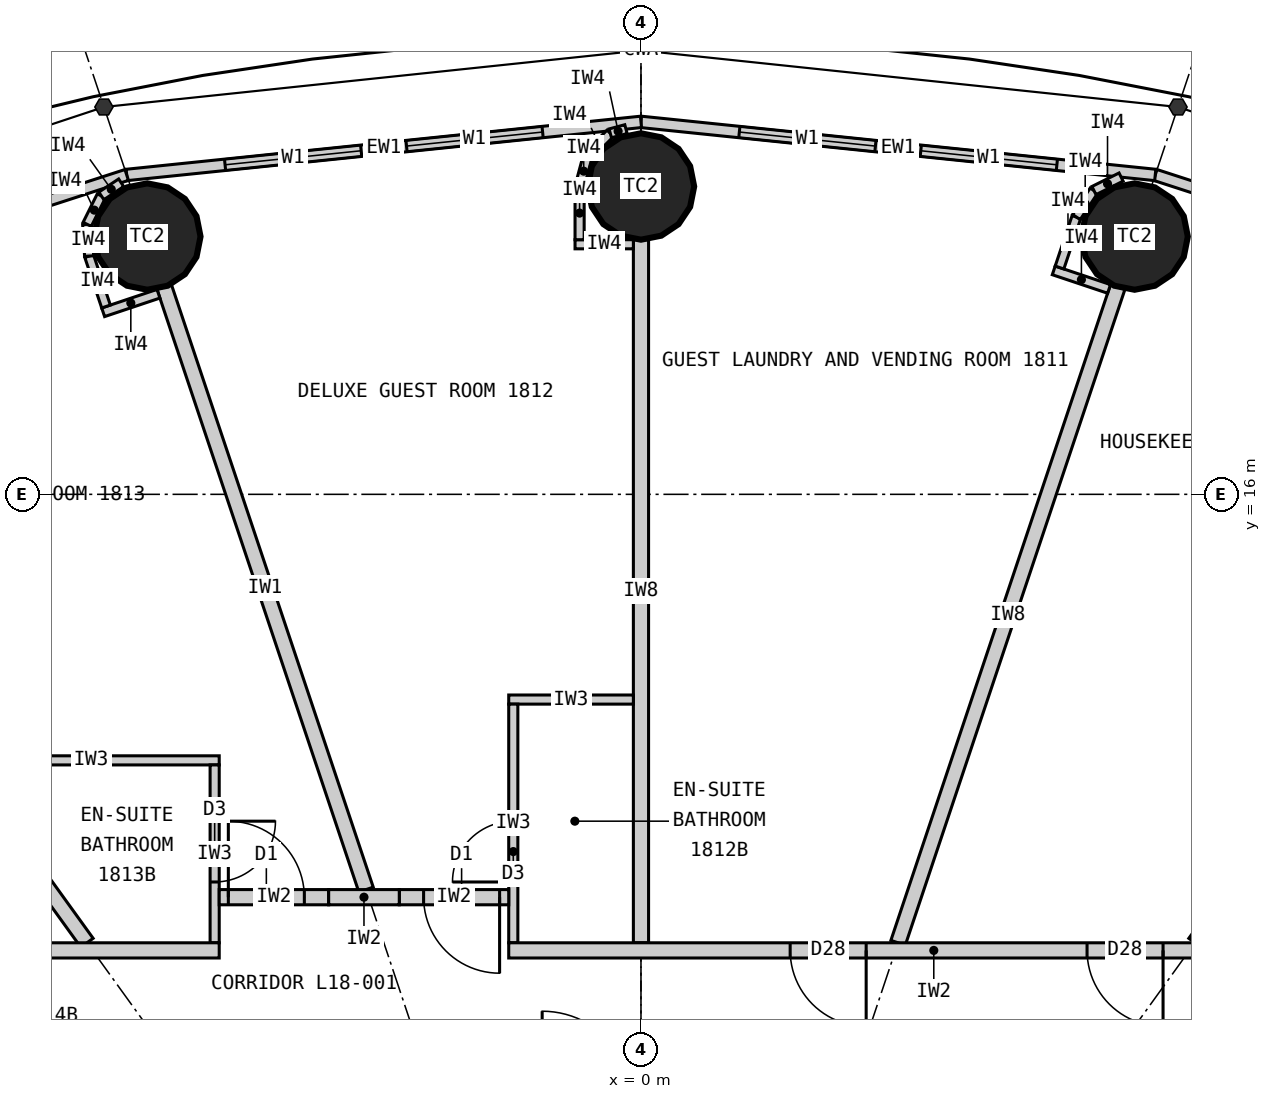
"""IFC4 building model, lengths in metres.
Left out: names, types, materials, properties, quantities, classifications, styles, units other than length and angle.
Written with IfcOpenShell. Run it as: python <this file> out.ifc"""

import sys

from ifc_helpers import new_model, si_unit, direction, frame, frame_2d, origin, origin_2d, place, context, subcontext, project, spatial, rectangle, circle, extrude, element, fill, save


model = new_model("IFC4")
c1 = context("Model", 3, precision=1e-05, world=origin(), true_north=direction((0.0, 1.0)))
c2 = subcontext(c1, "Body", "Model", "MODEL_VIEW")
j1 = project(units=[si_unit("LENGTHUNIT", "METRE"), si_unit("PLANEANGLEUNIT", "RADIAN")], contexts=[c1])
p1 = place(None, origin())
s1 = spatial("IfcSite", under=j1, at=p1, CompositionType="ELEMENT")
p2 = place(p1, origin())
s2 = spatial("IfcBuilding", under=s1, at=p2, CompositionType="ELEMENT")
p3 = place(p2, frame((0.0, 0.0, 73.8)))
s3 = spatial("IfcBuildingStorey", under=s2, at=p3, CompositionType="ELEMENT", Elevation=73.8)
for number, where, z_axis, x_axis in (
    (1, (6.495, 19.391, 0.0), (0.0, 0.0, 1.0), (1.0, 0.0, 0.0)),
    (2, (0.0, 20.05, 0.0), (0.0, 0.0, 1.0), (1.0, 0.0, 0.0)),
    (3, (-6.495, 19.391, 0.0), (0.0, 0.0, 1.0), (1.0, 0.0, 0.0)),
):
    element("IfcColumn", number, at=place(p3, frame(where, z_axis=z_axis, x_axis=x_axis)), inside=s3, PredefinedType="COLUMN", context=c2, shape_type="SweptSolid", body=[
        extrude(circle(Radius=0.7, at=origin_2d()), origin(), (0.0, 0.0, 1.0), 3.3),
    ])
p4 = place(p3, frame((13.096, 18.147, 0.0), z_axis=(0.0, 0.0, 1.0), x_axis=(-0.951137534625, 0.308767534285, 0.0)))
e4 = element("IfcWall", 4, at=p4, inside=s3, PredefinedType="ELEMENTEDWALL", context=c2, shape_type="SweptSolid", body=[
    extrude(rectangle(XDim=6.655, YDim=0.15, at=frame_2d((3.328, 0.0))), origin(), (0.0, 0.0, 1.0), 3.12),
])
p5 = place(p4, frame((1.228, 0.0, 0.9)))
e5 = element("IfcOpeningElement", 5, at=p5, cuts=e4, PredefinedType="OPENING", context=c2, shape_type="SweptSolid", body=[
    extrude(rectangle(XDim=1.8, YDim=1.9, at=frame_2d((0.9, 0.95))), frame((0.0, 0.085, 0.0), z_axis=(0.0, -1.0, 0.0), x_axis=(1.0, 0.0, 0.0)), (0.0, 0.0, 1.0), 0.17),
])
p6 = place(p4, frame((3.628, 0.0, 0.9)))
e6 = element("IfcOpeningElement", 6, at=p6, cuts=e4, PredefinedType="OPENING", context=c2, shape_type="SweptSolid", body=[
    extrude(rectangle(XDim=1.8, YDim=1.9, at=frame_2d((0.9, 0.95))), frame((0.0, 0.085, 0.0), z_axis=(0.0, -1.0, 0.0), x_axis=(1.0, 0.0, 0.0)), (0.0, 0.0, 1.0), 0.17),
])
p7 = place(p3, frame((6.766, 20.202, 0.0), z_axis=(0.0, 0.0, 1.0), x_axis=(-0.994721394369, 0.102612609291, 0.0)))
e7 = element("IfcWall", 7, at=p7, inside=s3, PredefinedType="ELEMENTEDWALL", context=c2, shape_type="SweptSolid", body=[
    extrude(rectangle(XDim=6.802, YDim=0.15, at=frame_2d((3.401, 0.0))), origin(), (0.0, 0.0, 1.0), 3.12),
])
p8 = place(p7, frame((1.301, 0.0, 0.9)))
e8 = element("IfcOpeningElement", 8, at=p8, cuts=e7, PredefinedType="OPENING", context=c2, shape_type="SweptSolid", body=[
    extrude(rectangle(XDim=1.8, YDim=1.9, at=frame_2d((0.9, 0.95))), frame((0.0, 0.085, 0.0), z_axis=(0.0, -1.0, 0.0), x_axis=(1.0, 0.0, 0.0)), (0.0, 0.0, 1.0), 0.17),
])
p9 = place(p7, frame((3.701, 0.0, 0.9)))
e9 = element("IfcOpeningElement", 9, at=p9, cuts=e7, PredefinedType="OPENING", context=c2, shape_type="SweptSolid", body=[
    extrude(rectangle(XDim=1.8, YDim=1.9, at=frame_2d((0.9, 0.95))), frame((0.0, 0.085, 0.0), z_axis=(0.0, -1.0, 0.0), x_axis=(1.0, 0.0, 0.0)), (0.0, 0.0, 1.0), 0.17),
])
p10 = place(p3, frame((0.0, 20.9, 0.0), z_axis=(0.0, 0.0, 1.0), x_axis=(-0.994721394369, -0.102612609291, 0.0)))
e10 = element("IfcWall", 10, at=p10, inside=s3, PredefinedType="ELEMENTEDWALL", context=c2, shape_type="SweptSolid", body=[
    extrude(rectangle(XDim=6.802, YDim=0.15, at=frame_2d((3.401, 0.0))), origin(), (0.0, 0.0, 1.0), 3.12),
])
p11 = place(p10, frame((1.301, 0.0, 0.9)))
e11 = element("IfcOpeningElement", 11, at=p11, cuts=e10, PredefinedType="OPENING", context=c2, shape_type="SweptSolid", body=[
    extrude(rectangle(XDim=1.8, YDim=1.9, at=frame_2d((0.9, 0.95))), frame((0.0, 0.085, 0.0), z_axis=(0.0, -1.0, 0.0), x_axis=(1.0, 0.0, 0.0)), (0.0, 0.0, 1.0), 0.17),
])
p12 = place(p10, frame((3.701, 0.0, 0.9)))
e12 = element("IfcOpeningElement", 12, at=p12, cuts=e10, PredefinedType="OPENING", context=c2, shape_type="SweptSolid", body=[
    extrude(rectangle(XDim=1.8, YDim=1.9, at=frame_2d((0.9, 0.95))), frame((0.0, 0.085, 0.0), z_axis=(0.0, -1.0, 0.0), x_axis=(1.0, 0.0, 0.0)), (0.0, 0.0, 1.0), 0.17),
])
p13 = place(p3, frame((-6.766, 20.202, 0.0), z_axis=(0.0, 0.0, 1.0), x_axis=(-0.951137534625, -0.308767534285, 0.0)))
e13 = element("IfcWall", 13, at=p13, inside=s3, PredefinedType="ELEMENTEDWALL", context=c2, shape_type="SweptSolid", body=[
    extrude(rectangle(XDim=6.655, YDim=0.15, at=frame_2d((3.328, 0.0))), origin(), (0.0, 0.0, 1.0), 3.12),
])
p14 = place(p13, frame((1.228, 0.0, 0.9)))
e14 = element("IfcOpeningElement", 14, at=p14, cuts=e13, PredefinedType="OPENING", context=c2, shape_type="SweptSolid", body=[
    extrude(rectangle(XDim=1.8, YDim=1.9, at=frame_2d((0.9, 0.95))), frame((0.0, 0.085, 0.0), z_axis=(0.0, -1.0, 0.0), x_axis=(1.0, 0.0, 0.0)), (0.0, 0.0, 1.0), 0.17),
])
p15 = place(p13, frame((3.628, 0.0, 0.9)))
e15 = element("IfcOpeningElement", 15, at=p15, cuts=e13, PredefinedType="OPENING", context=c2, shape_type="SweptSolid", body=[
    extrude(rectangle(XDim=1.8, YDim=1.9, at=frame_2d((0.9, 0.95))), frame((0.0, 0.085, 0.0), z_axis=(0.0, -1.0, 0.0), x_axis=(1.0, 0.0, 0.0)), (0.0, 0.0, 1.0), 0.17),
])
p16 = place(p3, frame((7.289, 10.1, 0.0), z_axis=(0.0, 0.0, 1.0), x_axis=(0.585198353053, 0.810890182197, 0.0)))
e16 = element("IfcWall", 16, at=p16, inside=s3, PredefinedType="PARTITIONING", context=c2, shape_type="SweptSolid", body=[
    extrude(rectangle(XDim=8.36, YDim=0.2, at=frame_2d((4.18, 0.0))), origin(), (0.0, 0.0, 1.0), 2.32),
])
p17 = place(p3, frame((3.383, 10.1, 0.0), z_axis=(0.0, 0.0, 1.0), x_axis=(0.31759592231, 0.948226149256, 0.0)))
e17 = element("IfcWall", 17, at=p17, inside=s3, PredefinedType="PARTITIONING", context=c2, shape_type="SweptSolid", body=[
    extrude(rectangle(XDim=9.098, YDim=0.2, at=frame_2d((4.549, 0.0))), origin(), (0.0, 0.0, 1.0), 2.32),
])
p18 = place(p3, frame((0.0, 10.1, 0.0), z_axis=(0.0, 0.0, 1.0), x_axis=(0.0, 1.0, 0.0)))
e18 = element("IfcWall", 18, at=p18, inside=s3, PredefinedType="PARTITIONING", context=c2, shape_type="SweptSolid", body=[
    extrude(rectangle(XDim=9.25, YDim=0.2, at=frame_2d((4.625, 0.0))), origin(), (0.0, 0.0, 1.0), 2.32),
])
p19 = place(p3, frame((-3.617, 10.8, 0.0), z_axis=(0.0, 0.0, 1.0), x_axis=(-0.317576599239, 0.948232621046, 0.0)))
e19 = element("IfcWall", 19, at=p19, inside=s3, PredefinedType="PARTITIONING", context=c2, shape_type="SweptSolid", body=[
    extrude(rectangle(XDim=8.36, YDim=0.2, at=frame_2d((4.18, 0.0))), origin(), (0.0, 0.0, 1.0), 2.32),
])
p20 = place(p3, frame((-7.289, 10.1, 0.0), z_axis=(0.0, 0.0, 1.0), x_axis=(-0.585198353053, 0.810890182197, 0.0)))
e20 = element("IfcWall", 20, at=p20, inside=s3, PredefinedType="PARTITIONING", context=c2, shape_type="SweptSolid", body=[
    extrude(rectangle(XDim=8.36, YDim=0.2, at=frame_2d((4.18, 0.0))), origin(), (0.0, 0.0, 1.0), 2.32),
])
p21 = place(p3, frame((-0.1, 13.3, 0.0), z_axis=(0.0, 0.0, 1.0), x_axis=(-1.0, 0.0, 0.0)))
e21 = element("IfcWall", 21, at=p21, inside=s3, PredefinedType="PARTITIONING", context=c2, shape_type="SweptSolid", body=[
    extrude(rectangle(XDim=1.64, YDim=0.12, at=frame_2d((0.82, 0.0))), origin(), (0.0, 0.0, 1.0), 3.12),
])
p22 = place(p3, frame((-1.68, 10.1, 0.0), z_axis=(0.0, 0.0, 1.0), x_axis=(0.0, 1.0, 0.0)))
e22 = element("IfcWall", 22, at=p22, inside=s3, PredefinedType="PARTITIONING", context=c2, shape_type="SweptSolid", body=[
    extrude(rectangle(XDim=3.14, YDim=0.12, at=frame_2d((1.57, 0.0))), origin(), (0.0, 0.0, 1.0), 3.12),
])
p23 = place(p22, frame((0.8, 0.0, 0.0)))
e23 = element("IfcOpeningElement", 23, at=p23, cuts=e22, PredefinedType="OPENING", context=c2, shape_type="SweptSolid", body=[
    extrude(rectangle(XDim=0.8, YDim=2.1, at=frame_2d((0.4, 1.05))), frame((0.0, 0.07, 0.0), z_axis=(0.0, -1.0, 0.0), x_axis=(1.0, 0.0, 0.0)), (0.0, 0.0, 1.0), 0.14),
])
p24 = place(p3, frame((-8.921, 12.5, 0.0), z_axis=(0.0, 0.0, 1.0), x_axis=(1.0, 0.0, 0.0)))
e24 = element("IfcWall", 24, at=p24, inside=s3, PredefinedType="PARTITIONING", context=c2, shape_type="SweptSolid", body=[
    extrude(rectangle(XDim=3.372, YDim=0.12, at=frame_2d((1.686, 0.0))), origin(), (0.0, 0.0, 1.0), 3.12),
])
p25 = place(p3, frame((-5.609, 10.1, 0.0), z_axis=(0.0, 0.0, 1.0), x_axis=(0.0, 1.0, 0.0)))
e25 = element("IfcWall", 25, at=p25, inside=s3, PredefinedType="PARTITIONING", context=c2, shape_type="SweptSolid", body=[
    extrude(rectangle(XDim=2.34, YDim=0.12, at=frame_2d((1.17, 0.0))), origin(), (0.0, 0.0, 1.0), 3.12),
])
p26 = place(p25, frame((0.8, 0.0, 0.0)))
e26 = element("IfcOpeningElement", 26, at=p26, cuts=e25, PredefinedType="OPENING", context=c2, shape_type="SweptSolid", body=[
    extrude(rectangle(XDim=0.8, YDim=2.1, at=frame_2d((0.4, 1.05))), frame((0.0, 0.07, 0.0), z_axis=(0.0, -1.0, 0.0), x_axis=(1.0, 0.0, 0.0)), (0.0, 0.0, 1.0), 0.14),
])
p27 = place(p3, frame((-3.18, 10.7, 0.0), z_axis=(0.0, 0.0, 1.0), x_axis=(1.0, 0.0, 0.0)))
e27 = element("IfcWall", 27, at=p27, inside=s3, PredefinedType="PARTITIONING", context=c2, shape_type="SweptSolid", body=[
    extrude(rectangle(XDim=1.44, YDim=0.2, at=frame_2d((0.72, 0.0))), origin(), (0.0, 0.0, 1.0), 3.12),
])
p28 = place(p27, frame((0.32, 0.0, 0.0)))
e28 = element("IfcOpeningElement", 28, at=p28, cuts=e27, PredefinedType="OPENING", context=c2, shape_type="SweptSolid", body=[
    extrude(rectangle(XDim=1.0, YDim=2.2, at=frame_2d((0.5, 1.1))), frame((0.0, 0.11, 0.0), z_axis=(0.0, -1.0, 0.0), x_axis=(1.0, 0.0, 0.0)), (0.0, 0.0, 1.0), 0.22),
])
p29 = place(p3, frame((-5.549, 10.7, 0.0), z_axis=(0.0, 0.0, 1.0), x_axis=(1.0, 0.0, 0.0)))
e29 = element("IfcWall", 29, at=p29, inside=s3, PredefinedType="PARTITIONING", context=c2, shape_type="SweptSolid", body=[
    extrude(rectangle(XDim=1.44, YDim=0.2, at=frame_2d((0.72, 0.0))), origin(), (0.0, 0.0, 1.0), 3.12),
])
p30 = place(p29, frame((0.12, 0.0, 0.0)))
e30 = element("IfcOpeningElement", 30, at=p30, cuts=e29, PredefinedType="OPENING", context=c2, shape_type="SweptSolid", body=[
    extrude(rectangle(XDim=1.0, YDim=2.2, at=frame_2d((0.5, 1.1))), frame((0.0, 0.11, 0.0), z_axis=(0.0, -1.0, 0.0), x_axis=(1.0, 0.0, 0.0)), (0.0, 0.0, 1.0), 0.22),
])
p31 = place(p3, frame((-4.109, 10.7, 0.0), z_axis=(0.0, 0.0, 1.0), x_axis=(1.0, 0.0, 0.0)))
e31 = element("IfcWall", 31, at=p31, inside=s3, PredefinedType="PARTITIONING", context=c2, shape_type="SweptSolid", body=[
    extrude(rectangle(XDim=0.929, YDim=0.2, at=frame_2d((0.465, 0.0))), origin(), (0.0, 0.0, 1.0), 3.12),
])
p32 = place(p3, frame((-10.179, 10.0, 0.0), z_axis=(0.0, 0.0, 1.0), x_axis=(1.0, 0.0, 0.0)))
e32 = element("IfcWall", 32, at=p32, inside=s3, PredefinedType="PARTITIONING", context=c2, shape_type="SweptSolid", body=[
    extrude(rectangle(XDim=4.63, YDim=0.2, at=frame_2d((2.315, 0.0))), origin(), (0.0, 0.0, 1.0), 3.12),
])
p33 = place(p3, frame((-1.74, 10.0, 0.0), z_axis=(0.0, 0.0, 1.0), x_axis=(1.0, 0.0, 0.0)))
e33 = element("IfcWall", 33, at=p33, inside=s3, PredefinedType="PARTITIONING", context=c2, shape_type="SweptSolid", body=[
    extrude(rectangle(XDim=11.185, YDim=0.2, at=frame_2d((5.593, 0.0))), origin(), (0.0, 0.0, 1.0), 3.12),
])
p34 = place(p33, frame((7.609, 0.0, 0.0)))
e34 = element("IfcOpeningElement", 34, at=p34, cuts=e33, PredefinedType="OPENING", context=c2, shape_type="SweptSolid", body=[
    extrude(rectangle(XDim=1.0, YDim=2.2, at=frame_2d((0.5, 1.1))), frame((0.0, 0.11, 0.0), z_axis=(0.0, -1.0, 0.0), x_axis=(1.0, 0.0, 0.0)), (0.0, 0.0, 1.0), 0.22),
])
p35 = place(p33, frame((3.703, 0.0, 0.0)))
e35 = element("IfcOpeningElement", 35, at=p35, cuts=e33, PredefinedType="OPENING", context=c2, shape_type="SweptSolid", body=[
    extrude(rectangle(XDim=1.0, YDim=2.2, at=frame_2d((0.5, 1.1))), frame((0.0, 0.11, 0.0), z_axis=(0.0, -1.0, 0.0), x_axis=(1.0, 0.0, 0.0)), (0.0, 0.0, 1.0), 0.22),
])
p36 = place(p3, frame((6.159, 18.702, 0.0), z_axis=(0.0, 0.0, 1.0), x_axis=(-0.948173154049, 0.31775410295, 0.0)))
e36 = element("IfcWall", 36, at=p36, inside=s3, PredefinedType="PARTITIONING", context=c2, shape_type="SweptSolid", body=[
    extrude(rectangle(XDim=0.768, YDim=0.12, at=frame_2d((0.384, 0.0))), origin(), (0.0, 0.0, 1.0), 3.12),
])
p37 = place(p3, frame((5.507, 18.984, 0.0), z_axis=(0.0, 0.0, 1.0), x_axis=(0.317692050622, 0.948193946918, 0.0)))
e37 = element("IfcWall", 37, at=p37, inside=s3, PredefinedType="PARTITIONING", context=c2, shape_type="SweptSolid", body=[
    extrude(rectangle(XDim=0.7, YDim=0.12, at=frame_2d((0.35, 0.0))), origin(), (0.0, 0.0, 1.0), 3.12),
])
p38 = place(p3, frame((5.729, 19.648, 0.0), z_axis=(0.0, 0.0, 1.0), x_axis=(0.552135764955, 0.833754218615, 0.0)))
e38 = element("IfcWall", 38, at=p38, inside=s3, PredefinedType="PARTITIONING", context=c2, shape_type="SweptSolid", body=[
    extrude(rectangle(XDim=0.418, YDim=0.12, at=frame_2d((0.209, 0.0))), origin(), (0.0, 0.0, 1.0), 3.12),
])
p39 = place(p3, frame((5.96, 19.996, 0.0), z_axis=(0.0, 0.0, 1.0), x_axis=(0.895160725913, 0.445743507842, 0.0)))
e39 = element("IfcWall", 39, at=p39, inside=s3, PredefinedType="PARTITIONING", context=c2, shape_type="SweptSolid", body=[
    extrude(rectangle(XDim=0.399, YDim=0.12, at=frame_2d((0.199, 0.0))), origin(), (0.0, 0.0, 1.0), 3.12),
])
p40 = place(p3, frame((-0.1, 19.29, 0.0), z_axis=(0.0, 0.0, 1.0), x_axis=(-1.0, 0.0, 0.0)))
e40 = element("IfcWall", 40, at=p40, inside=s3, PredefinedType="PARTITIONING", context=c2, shape_type="SweptSolid", body=[
    extrude(rectangle(XDim=0.767, YDim=0.12, at=frame_2d((0.384, 0.0))), origin(), (0.0, 0.0, 1.0), 3.12),
])
p41 = place(p3, frame((-0.808, 19.35, 0.0), z_axis=(0.0, 0.0, 1.0), x_axis=(0.0, 1.0, 0.0)))
e41 = element("IfcWall", 41, at=p41, inside=s3, PredefinedType="PARTITIONING", context=c2, shape_type="SweptSolid", body=[
    extrude(rectangle(XDim=0.7, YDim=0.12, at=frame_2d((0.35, 0.0))), origin(), (0.0, 0.0, 1.0), 3.12),
])
p42 = place(p3, frame((-0.808, 20.05, 0.0), z_axis=(0.0, 0.0, 1.0), x_axis=(0.2592614205, 0.965807183573, 0.0)))
e42 = element("IfcWall", 42, at=p42, inside=s3, PredefinedType="PARTITIONING", context=c2, shape_type="SweptSolid", body=[
    extrude(rectangle(XDim=0.418, YDim=0.12, at=frame_2d((0.209, 0.0))), origin(), (0.0, 0.0, 1.0), 3.12),
])
p43 = place(p3, frame((-0.699, 20.454, 0.0), z_axis=(0.0, 0.0, 1.0), x_axis=(0.707106781187, 0.707106781187, 0.0)))
e43 = element("IfcWall", 43, at=p43, inside=s3, PredefinedType="PARTITIONING", context=c2, shape_type="SweptSolid", body=[
    extrude(rectangle(XDim=0.418, YDim=0.12, at=frame_2d((0.209, 0.0))), origin(), (0.0, 0.0, 1.0), 3.12),
])
p44 = place(p3, frame((-0.404, 20.749, 0.0), z_axis=(0.0, 0.0, 1.0), x_axis=(0.965759066438, 0.25944060128, 0.0)))
e44 = element("IfcWall", 44, at=p44, inside=s3, PredefinedType="PARTITIONING", context=c2, shape_type="SweptSolid", body=[
    extrude(rectangle(XDim=0.214, YDim=0.12, at=frame_2d((0.107, 0.0))), origin(), (0.0, 0.0, 1.0), 3.12),
])
p45 = place(p3, frame((-6.348, 18.639, 0.0), z_axis=(0.0, 0.0, 1.0), x_axis=(-0.948268951266, -0.317468102437, 0.0)))
e45 = element("IfcWall", 45, at=p45, inside=s3, PredefinedType="PARTITIONING", context=c2, shape_type="SweptSolid", body=[
    extrude(rectangle(XDim=0.768, YDim=0.12, at=frame_2d((0.384, 0.0))), origin(), (0.0, 0.0, 1.0), 3.12),
])
p46 = place(p3, frame((-7.038, 18.471, 0.0), z_axis=(0.0, 0.0, 1.0), x_axis=(-0.317378466199, 0.9482989556, 0.0)))
e46 = element("IfcWall", 46, at=p46, inside=s3, PredefinedType="PARTITIONING", context=c2, shape_type="SweptSolid", body=[
    extrude(rectangle(XDim=0.7, YDim=0.12, at=frame_2d((0.35, 0.0))), origin(), (0.0, 0.0, 1.0), 3.12),
])
p47 = place(p3, frame((-7.26, 19.135, 0.0), z_axis=(0.0, 0.0, 1.0), x_axis=(-0.0613238046, 0.99811792439, 0.0)))
e47 = element("IfcWall", 47, at=p47, inside=s3, PredefinedType="PARTITIONING", context=c2, shape_type="SweptSolid", body=[
    extrude(rectangle(XDim=0.418, YDim=0.12, at=frame_2d((0.209, 0.0))), origin(), (0.0, 0.0, 1.0), 3.12),
])
p48 = place(p3, frame((-7.286, 19.552, 0.0), z_axis=(0.0, 0.0, 1.0), x_axis=(0.445810757773, 0.89512723579, 0.0)))
e48 = element("IfcWall", 48, at=p48, inside=s3, PredefinedType="PARTITIONING", context=c2, shape_type="SweptSolid", body=[
    extrude(rectangle(XDim=0.418, YDim=0.12, at=frame_2d((0.209, 0.0))), origin(), (0.0, 0.0, 1.0), 3.12),
])
p49 = place(p3, frame((-7.1, 19.926, 0.0), z_axis=(0.0, 0.0, 1.0), x_axis=(0.833488262509, 0.552537162787, 0.0)))
e49 = element("IfcWall", 49, at=p49, inside=s3, PredefinedType="PARTITIONING", context=c2, shape_type="SweptSolid", body=[
    extrude(rectangle(XDim=0.313, YDim=0.12, at=frame_2d((0.156, 0.0))), origin(), (0.0, 0.0, 1.0), 3.12),
])
p50 = place(p8, origin())
e50 = element("IfcWindow", 50, at=p50, inside=s3, PartitioningType="SINGLE_PANEL", PredefinedType="WINDOW", context=c2, shape_type="SweptSolid", body=[
    extrude(rectangle(XDim=1.8, YDim=1.9, at=frame_2d((0.9, 0.95))), frame((0.0, 0.03, 0.0), z_axis=(0.0, -1.0, 0.0), x_axis=(1.0, 0.0, 0.0)), (0.0, 0.0, 1.0), 0.06),
])
fill(e8, e50)
p51 = place(p9, origin())
e51 = element("IfcWindow", 51, at=p51, inside=s3, PartitioningType="SINGLE_PANEL", PredefinedType="WINDOW", context=c2, shape_type="SweptSolid", body=[
    extrude(rectangle(XDim=1.8, YDim=1.9, at=frame_2d((0.9, 0.95))), frame((0.0, 0.03, 0.0), z_axis=(0.0, -1.0, 0.0), x_axis=(1.0, 0.0, 0.0)), (0.0, 0.0, 1.0), 0.06),
])
fill(e9, e51)
p52 = place(p11, origin())
e52 = element("IfcWindow", 52, at=p52, inside=s3, PartitioningType="SINGLE_PANEL", PredefinedType="WINDOW", context=c2, shape_type="SweptSolid", body=[
    extrude(rectangle(XDim=1.8, YDim=1.9, at=frame_2d((0.9, 0.95))), frame((0.0, 0.03, 0.0), z_axis=(0.0, -1.0, 0.0), x_axis=(1.0, 0.0, 0.0)), (0.0, 0.0, 1.0), 0.06),
])
fill(e11, e52)
p53 = place(p12, origin())
e53 = element("IfcWindow", 53, at=p53, inside=s3, PartitioningType="SINGLE_PANEL", PredefinedType="WINDOW", context=c2, shape_type="SweptSolid", body=[
    extrude(rectangle(XDim=1.8, YDim=1.9, at=frame_2d((0.9, 0.95))), frame((0.0, 0.03, 0.0), z_axis=(0.0, -1.0, 0.0), x_axis=(1.0, 0.0, 0.0)), (0.0, 0.0, 1.0), 0.06),
])
fill(e12, e53)
p54 = place(p34, origin())
e54 = element("IfcDoor", 54, at=p54, inside=s3, OperationType="SINGLE_SWING_RIGHT", PredefinedType="DOOR", context=c2, shape_type="SweptSolid", body=[
    extrude(rectangle(XDim=1.0, YDim=2.2, at=frame_2d((0.5, 1.1))), frame((0.0, 0.025, 0.0), z_axis=(0.0, -1.0, 0.0), x_axis=(1.0, 0.0, 0.0)), (0.0, 0.0, 1.0), 0.05),
])
fill(e34, e54)
p55 = place(p35, origin())
e55 = element("IfcDoor", 55, at=p55, inside=s3, OperationType="SINGLE_SWING_RIGHT", PredefinedType="DOOR", context=c2, shape_type="SweptSolid", body=[
    extrude(rectangle(XDim=1.0, YDim=2.2, at=frame_2d((0.5, 1.1))), frame((0.0, 0.025, 0.0), z_axis=(0.0, -1.0, 0.0), x_axis=(1.0, 0.0, 0.0)), (0.0, 0.0, 1.0), 0.05),
])
fill(e35, e55)
p56 = place(p23, origin())
e56 = element("IfcDoor", 56, at=p56, inside=s3, OperationType="SINGLE_SWING_LEFT", PredefinedType="DOOR", context=c2, shape_type="SweptSolid", body=[
    extrude(rectangle(XDim=0.8, YDim=2.1, at=frame_2d((0.4, 1.05))), frame((0.0, 0.025, 0.0), z_axis=(0.0, -1.0, 0.0), x_axis=(1.0, 0.0, 0.0)), (0.0, 0.0, 1.0), 0.05),
])
fill(e23, e56)
p57 = place(p28, origin())
e57 = element("IfcDoor", 57, at=p57, inside=s3, OperationType="SINGLE_SWING_RIGHT", PredefinedType="DOOR", context=c2, shape_type="SweptSolid", body=[
    extrude(rectangle(XDim=1.0, YDim=2.2, at=frame_2d((0.5, 1.1))), frame((0.0, 0.025, 0.0), z_axis=(0.0, -1.0, 0.0), x_axis=(1.0, 0.0, 0.0)), (0.0, 0.0, 1.0), 0.05),
])
fill(e28, e57)
p58 = place(p26, origin())
e58 = element("IfcDoor", 58, at=p58, inside=s3, OperationType="SINGLE_SWING_RIGHT", PredefinedType="DOOR", context=c2, shape_type="SweptSolid", body=[
    extrude(rectangle(XDim=0.8, YDim=2.1, at=frame_2d((0.4, 1.05))), frame((0.0, 0.025, 0.0), z_axis=(0.0, -1.0, 0.0), x_axis=(1.0, 0.0, 0.0)), (0.0, 0.0, 1.0), 0.05),
])
fill(e26, e58)
p59 = place(p30, origin())
e59 = element("IfcDoor", 59, at=p59, inside=s3, OperationType="SINGLE_SWING_LEFT", PredefinedType="DOOR", context=c2, shape_type="SweptSolid", body=[
    extrude(rectangle(XDim=1.0, YDim=2.2, at=frame_2d((0.5, 1.1))), frame((0.0, 0.025, 0.0), z_axis=(0.0, -1.0, 0.0), x_axis=(1.0, 0.0, 0.0)), (0.0, 0.0, 1.0), 0.05),
])
fill(e30, e59)
save(model, sys.argv[1])
